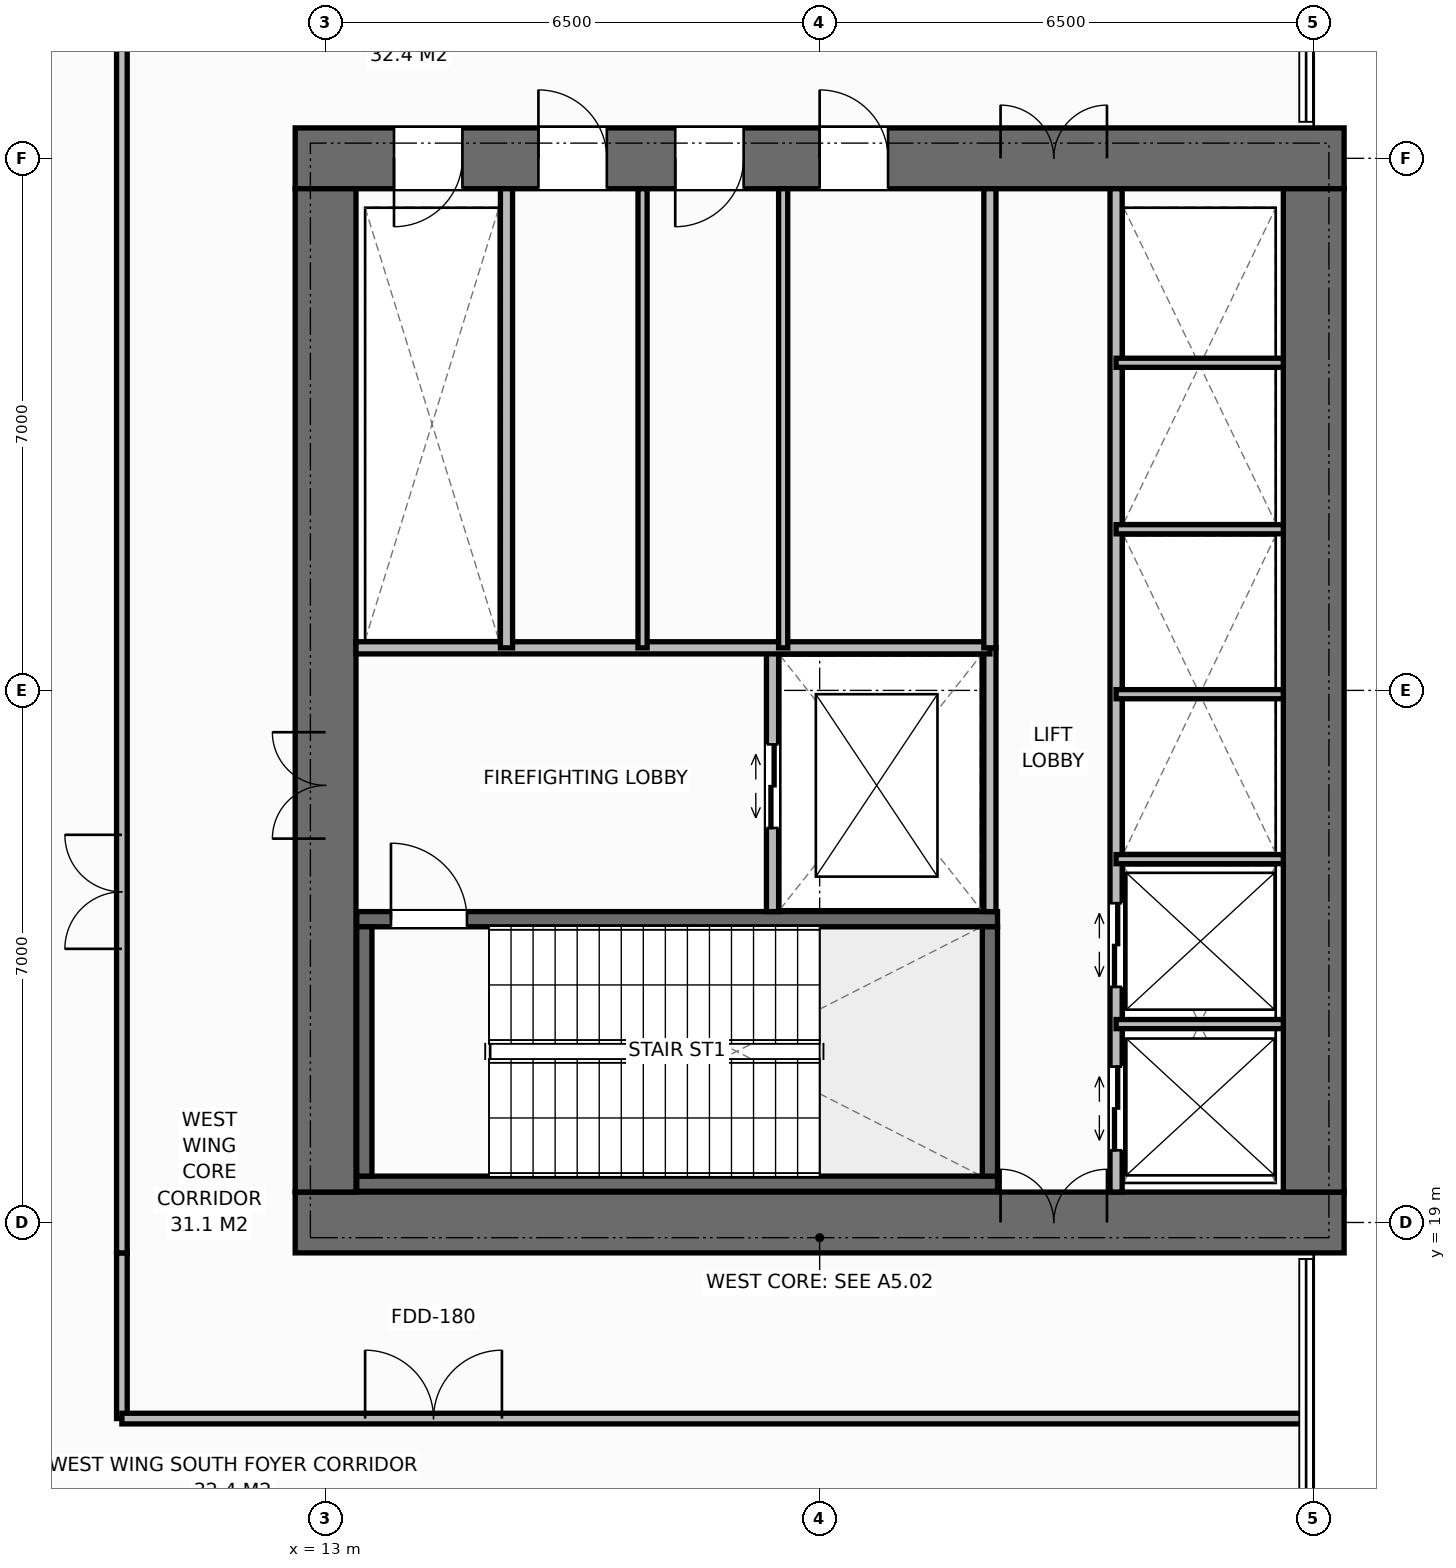
"""IFC4 building model, lengths in metres.
Left out: names, types, materials, properties, quantities, classifications, styles, units other than length and angle.
Written with IfcOpenShell. Run it as: python <this file> out.ifc"""

import sys

from ifc_helpers import new_model, si_unit, direction, frame, frame_2d, origin, place, context, subcontext, project, spatial, rectangle, extrude, element, fill, save


model = new_model("IFC4")
c1 = context("Model", 3, precision=1e-05, world=origin(), true_north=direction((0.0, 1.0)))
c2 = subcontext(c1, "Body", "Model", "MODEL_VIEW")
j1 = project(units=[si_unit("LENGTHUNIT", "METRE"), si_unit("PLANEANGLEUNIT", "RADIAN")], contexts=[c1])
p1 = place(None, origin())
s1 = spatial("IfcSite", under=j1, at=p1, CompositionType="ELEMENT")
p2 = place(p1, origin())
s2 = spatial("IfcBuilding", under=s1, at=p2, CompositionType="ELEMENT")
p3 = place(p2, frame((0.0, 0.0, 11.5)))
s3 = spatial("IfcBuildingStorey", under=s2, at=p3, CompositionType="ELEMENT", Elevation=11.5)
p4 = place(p3, frame((12.6, 19.0, 0.0), z_axis=(0.0, 0.0, 1.0), x_axis=(1.0, 0.0, 0.0)))
e1 = element("IfcWall", 1, at=p4, inside=s3, PredefinedType="SHEAR", context=c2, shape_type="SweptSolid", body=[
    extrude(rectangle(XDim=13.8, YDim=0.8, at=frame_2d((6.9, 0.0))), origin(), (0.0, 0.0, 1.0), 5.5),
])
p5 = place(p4, frame((9.28, 0.0, 0.0)))
e2 = element("IfcOpeningElement", 2, at=p5, cuts=e1, PredefinedType="OPENING", context=c2, shape_type="SweptSolid", body=[
    extrude(rectangle(XDim=1.4, YDim=2.2, at=frame_2d((0.7, 1.1))), frame((0.0, 0.41, 0.0), z_axis=(0.0, -1.0, 0.0), x_axis=(1.0, 0.0, 0.0)), (0.0, 0.0, 1.0), 0.82),
])
p6 = place(p3, frame((12.6, 33.0, 0.0), z_axis=(0.0, 0.0, 1.0), x_axis=(1.0, 0.0, 0.0)))
e3 = element("IfcWall", 3, at=p6, inside=s3, PredefinedType="SHEAR", context=c2, shape_type="SweptSolid", body=[
    extrude(rectangle(XDim=13.8, YDim=0.8, at=frame_2d((6.9, 0.0))), origin(), (0.0, 0.0, 1.0), 5.5),
])
p7 = place(p6, frame((1.3, 0.0, 0.0)))
e4 = element("IfcOpeningElement", 4, at=p7, cuts=e3, PredefinedType="OPENING", context=c2, shape_type="SweptSolid", body=[
    extrude(rectangle(XDim=0.9, YDim=2.15, at=frame_2d((0.45, 1.075))), frame((0.0, 0.41, 0.0), z_axis=(0.0, -1.0, 0.0), x_axis=(1.0, 0.0, 0.0)), (0.0, 0.0, 1.0), 0.82),
])
p8 = place(p6, frame((3.2, 0.0, 0.0)))
e5 = element("IfcOpeningElement", 5, at=p8, cuts=e3, PredefinedType="OPENING", context=c2, shape_type="SweptSolid", body=[
    extrude(rectangle(XDim=0.9, YDim=2.15, at=frame_2d((0.45, 1.075))), frame((0.0, 0.41, 0.0), z_axis=(0.0, -1.0, 0.0), x_axis=(1.0, 0.0, 0.0)), (0.0, 0.0, 1.0), 0.82),
])
p9 = place(p6, frame((5.0, 0.0, 0.0)))
e6 = element("IfcOpeningElement", 6, at=p9, cuts=e3, PredefinedType="OPENING", context=c2, shape_type="SweptSolid", body=[
    extrude(rectangle(XDim=0.9, YDim=2.15, at=frame_2d((0.45, 1.075))), frame((0.0, 0.41, 0.0), z_axis=(0.0, -1.0, 0.0), x_axis=(1.0, 0.0, 0.0)), (0.0, 0.0, 1.0), 0.82),
])
p10 = place(p6, frame((6.9, 0.0, 0.0)))
e7 = element("IfcOpeningElement", 7, at=p10, cuts=e3, PredefinedType="OPENING", context=c2, shape_type="SweptSolid", body=[
    extrude(rectangle(XDim=0.9, YDim=2.15, at=frame_2d((0.45, 1.075))), frame((0.0, 0.41, 0.0), z_axis=(0.0, -1.0, 0.0), x_axis=(1.0, 0.0, 0.0)), (0.0, 0.0, 1.0), 0.82),
])
p11 = place(p6, frame((9.28, 0.0, 0.0)))
e8 = element("IfcOpeningElement", 8, at=p11, cuts=e3, PredefinedType="OPENING", context=c2, shape_type="SweptSolid", body=[
    extrude(rectangle(XDim=1.4, YDim=2.2, at=frame_2d((0.7, 1.1))), frame((0.0, 0.41, 0.0), z_axis=(0.0, -1.0, 0.0), x_axis=(1.0, 0.0, 0.0)), (0.0, 0.0, 1.0), 0.82),
])
p12 = place(p3, frame((13.0, 19.4, 0.0), z_axis=(0.0, 0.0, 1.0), x_axis=(0.0, 1.0, 0.0)))
e9 = element("IfcWall", 9, at=p12, inside=s3, PredefinedType="SHEAR", context=c2, shape_type="SweptSolid", body=[
    extrude(rectangle(XDim=13.2, YDim=0.8, at=frame_2d((6.6, 0.0))), origin(), (0.0, 0.0, 1.0), 5.5),
])
p13 = place(p12, frame((4.65, 0.0, 0.0)))
e10 = element("IfcOpeningElement", 10, at=p13, cuts=e9, PredefinedType="OPENING", context=c2, shape_type="SweptSolid", body=[
    extrude(rectangle(XDim=1.4, YDim=2.2, at=frame_2d((0.7, 1.1))), frame((0.0, 0.41, 0.0), z_axis=(0.0, -1.0, 0.0), x_axis=(1.0, 0.0, 0.0)), (0.0, 0.0, 1.0), 0.82),
])
p14 = place(p3, frame((26.0, 19.4, 0.0), z_axis=(0.0, 0.0, 1.0), x_axis=(0.0, 1.0, 0.0)))
e11 = element("IfcWall", 11, at=p14, inside=s3, PredefinedType="SHEAR", context=c2, shape_type="SweptSolid", body=[
    extrude(rectangle(XDim=13.2, YDim=0.8, at=frame_2d((6.6, 0.0))), origin(), (0.0, 0.0, 1.0), 5.5),
])
p15 = place(p3, frame((13.41, 19.51, 0.0), z_axis=(0.0, 0.0, 1.0), x_axis=(1.0, 0.0, 0.0)))
e12 = element("IfcWall", 12, at=p15, inside=s3, PredefinedType="SHEAR", context=c2, shape_type="SweptSolid", body=[
    extrude(rectangle(XDim=8.43, YDim=0.2, at=frame_2d((4.215, 0.0))), origin(), (0.0, 0.0, 1.0), 5.5),
])
p16 = place(p3, frame((13.41, 22.99, 0.0), z_axis=(0.0, 0.0, 1.0), x_axis=(1.0, 0.0, 0.0)))
e13 = element("IfcWall", 13, at=p16, inside=s3, PredefinedType="SHEAR", context=c2, shape_type="SweptSolid", body=[
    extrude(rectangle(XDim=8.43, YDim=0.2, at=frame_2d((4.215, 0.0))), origin(), (0.0, 0.0, 1.0), 5.5),
])
p17 = place(p16, frame((0.45, 0.0, 0.0)))
e14 = element("IfcOpeningElement", 14, at=p17, cuts=e13, PredefinedType="OPENING", context=c2, shape_type="SweptSolid", body=[
    extrude(rectangle(XDim=1.0, YDim=2.15, at=frame_2d((0.5, 1.075))), frame((0.0, 0.11, 0.0), z_axis=(0.0, -1.0, 0.0), x_axis=(1.0, 0.0, 0.0)), (0.0, 0.0, 1.0), 0.22),
])
for number, where, z_axis, x_axis in (
    (15, (13.51, 19.61, 0.0), (0.0, 0.0, 1.0), (0.0, 1.0, 0.0)),
    (16, (21.74, 19.61, 0.0), (0.0, 0.0, 1.0), (0.0, 1.0, 0.0)),
):
    element("IfcWall", number, at=place(p3, frame(where, z_axis=z_axis, x_axis=x_axis)), inside=s3, PredefinedType="SHEAR", context=c2, shape_type="SweptSolid", body=[
        extrude(rectangle(XDim=3.28, YDim=0.2, at=frame_2d((1.64, 0.0))), origin(), (0.0, 0.0, 1.0), 5.5),
    ])
p18 = place(p3, frame((21.74, 23.09, 0.0), z_axis=(0.0, 0.0, 1.0), x_axis=(0.0, 1.0, 0.0)))
e17 = element("IfcWall", 17, at=p18, inside=s3, PredefinedType="STANDARD", context=c2, shape_type="SweptSolid", body=[
    extrude(rectangle(XDim=3.47, YDim=0.16, at=frame_2d((1.735, 0.0))), origin(), (0.0, 0.0, 1.0), 5.22),
])
p19 = place(p3, frame((18.88, 23.09, 0.0), z_axis=(0.0, 0.0, 1.0), x_axis=(0.0, 1.0, 0.0)))
e18 = element("IfcWall", 18, at=p19, inside=s3, PredefinedType="STANDARD", context=c2, shape_type="SweptSolid", body=[
    extrude(rectangle(XDim=3.47, YDim=0.16, at=frame_2d((1.735, 0.0))), origin(), (0.0, 0.0, 1.0), 5.22),
])
p20 = place(p19, frame((1.1, 0.0, 0.0)))
e19 = element("IfcOpeningElement", 19, at=p20, cuts=e18, PredefinedType="OPENING", context=c2, shape_type="SweptSolid", body=[
    extrude(rectangle(XDim=1.1, YDim=2.2, at=frame_2d((0.55, 1.1))), frame((0.0, 0.09, 0.0), z_axis=(0.0, -1.0, 0.0), x_axis=(1.0, 0.0, 0.0)), (0.0, 0.0, 1.0), 0.18),
])
p21 = place(p3, frame((13.4, 26.56, 0.0), z_axis=(0.0, 0.0, 1.0), x_axis=(1.0, 0.0, 0.0)))
e20 = element("IfcWall", 20, at=p21, inside=s3, PredefinedType="STANDARD", context=c2, shape_type="SweptSolid", body=[
    extrude(rectangle(XDim=8.34, YDim=0.16, at=frame_2d((4.17, 0.0))), origin(), (0.0, 0.0, 1.0), 5.22),
])
p22 = place(p3, frame((15.38, 26.56, 0.0), z_axis=(0.0, 0.0, 1.0), x_axis=(0.0, 1.0, 0.0)))
e21 = element("IfcWall", 21, at=p22, inside=s3, PredefinedType="STANDARD", context=c2, shape_type="SweptSolid", body=[
    extrude(rectangle(XDim=6.04, YDim=0.16, at=frame_2d((3.02, 0.0))), origin(), (0.0, 0.0, 1.0), 5.22),
])
for number, where, z_axis, x_axis in (
    (22, (17.17, 26.56, 0.0), (0.0, 0.0, 1.0), (0.0, 1.0, 0.0)),
    (23, (19.02, 26.56, 0.0), (0.0, 0.0, 1.0), (0.0, 1.0, 0.0)),
):
    element("IfcWall", number, at=place(p3, frame(where, z_axis=z_axis, x_axis=x_axis)), inside=s3, PredefinedType="PARTITIONING", context=c2, shape_type="SweptSolid", body=[
        extrude(rectangle(XDim=6.04, YDim=0.12, at=frame_2d((3.02, 0.0))), origin(), (0.0, 0.0, 1.0), 5.22),
    ])
p23 = place(p3, frame((21.74, 26.56, 0.0), z_axis=(0.0, 0.0, 1.0), x_axis=(0.0, 1.0, 0.0)))
e24 = element("IfcWall", 24, at=p23, inside=s3, PredefinedType="STANDARD", context=c2, shape_type="SweptSolid", body=[
    extrude(rectangle(XDim=6.04, YDim=0.16, at=frame_2d((3.02, 0.0))), origin(), (0.0, 0.0, 1.0), 5.22),
])
p24 = place(p3, frame((23.4, 19.4, 0.0), z_axis=(0.0, 0.0, 1.0), x_axis=(0.0, 1.0, 0.0)))
e25 = element("IfcWall", 25, at=p24, inside=s3, PredefinedType="STANDARD", context=c2, shape_type="SweptSolid", body=[
    extrude(rectangle(XDim=13.2, YDim=0.16, at=frame_2d((6.6, 0.0))), origin(), (0.0, 0.0, 1.0), 5.22),
])
p25 = place(p24, frame((0.55, 0.0, 0.0)))
e26 = element("IfcOpeningElement", 26, at=p25, cuts=e25, PredefinedType="OPENING", context=c2, shape_type="SweptSolid", body=[
    extrude(rectangle(XDim=1.1, YDim=2.2, at=frame_2d((0.55, 1.1))), frame((0.0, 0.09, 0.0), z_axis=(0.0, -1.0, 0.0), x_axis=(1.0, 0.0, 0.0)), (0.0, 0.0, 1.0), 0.18),
])
p26 = place(p24, frame((2.7, 0.0, 0.0)))
e27 = element("IfcOpeningElement", 27, at=p26, cuts=e25, PredefinedType="OPENING", context=c2, shape_type="SweptSolid", body=[
    extrude(rectangle(XDim=1.1, YDim=2.2, at=frame_2d((0.55, 1.1))), frame((0.0, 0.09, 0.0), z_axis=(0.0, -1.0, 0.0), x_axis=(1.0, 0.0, 0.0)), (0.0, 0.0, 1.0), 0.18),
])
for number, where, z_axis, x_axis in (
    (28, (23.4, 21.61, 0.0), (0.0, 0.0, 1.0), (1.0, 0.0, 0.0)),
    (29, (23.4, 23.78, 0.0), (0.0, 0.0, 1.0), (1.0, 0.0, 0.0)),
    (30, (23.4, 25.95, 0.0), (0.0, 0.0, 1.0), (1.0, 0.0, 0.0)),
    (31, (23.4, 28.12, 0.0), (0.0, 0.0, 1.0), (1.0, 0.0, 0.0)),
    (32, (23.4, 30.31, 0.0), (0.0, 0.0, 1.0), (1.0, 0.0, 0.0)),
):
    element("IfcWall", number, at=place(p3, frame(where, z_axis=z_axis, x_axis=x_axis)), inside=s3, PredefinedType="PARTITIONING", context=c2, shape_type="SweptSolid", body=[
        extrude(rectangle(XDim=2.2, YDim=0.12, at=frame_2d((1.1, 0.0))), origin(), (0.0, 0.0, 1.0), 5.22),
    ])
p27 = place(p3, frame((10.32, 16.42, 0.0), z_axis=(0.0, 0.0, 1.0), x_axis=(0.0, 1.0, 0.0)))
e33 = element("IfcWall", 33, at=p27, inside=s3, PredefinedType="PARTITIONING", context=c2, shape_type="SweptSolid", body=[
    extrude(rectangle(XDim=2.18, YDim=0.14, at=frame_2d((1.09, 0.0))), origin(), (0.0, 0.0, 1.0), 5.22),
])
p28 = place(p3, frame((10.32, 16.42, 0.0), z_axis=(0.0, 0.0, 1.0), x_axis=(1.0, 0.0, 0.0)))
e34 = element("IfcWall", 34, at=p28, inside=s3, PredefinedType="PARTITIONING", context=c2, shape_type="SweptSolid", body=[
    extrude(rectangle(XDim=15.6, YDim=0.14, at=frame_2d((7.8, 0.0))), origin(), (0.0, 0.0, 1.0), 5.22),
])
p29 = place(p28, frame((3.2, 0.0, 0.0)))
e35 = element("IfcOpeningElement", 35, at=p29, cuts=e34, PredefinedType="OPENING", context=c2, shape_type="SweptSolid", body=[
    extrude(rectangle(XDim=1.8, YDim=2.2, at=frame_2d((0.9, 1.1))), frame((0.0, 0.08, 0.0), z_axis=(0.0, -1.0, 0.0), x_axis=(1.0, 0.0, 0.0)), (0.0, 0.0, 1.0), 0.16),
])
p30 = place(p3, frame((10.32, 18.6, 0.0), z_axis=(0.0, 0.0, 1.0), x_axis=(0.0, 1.0, 0.0)))
e36 = element("IfcWall", 36, at=p30, inside=s3, PredefinedType="PARTITIONING", context=c2, shape_type="SweptSolid", body=[
    extrude(rectangle(XDim=16.98, YDim=0.14, at=frame_2d((8.49, 0.0))), origin(), (0.0, 0.0, 1.0), 5.22),
])
p31 = place(p30, frame((4.0, 0.0, 0.0)))
e37 = element("IfcOpeningElement", 37, at=p31, cuts=e36, PredefinedType="OPENING", context=c2, shape_type="SweptSolid", body=[
    extrude(rectangle(XDim=1.5, YDim=2.2, at=frame_2d((0.75, 1.1))), frame((0.0, 0.08, 0.0), z_axis=(0.0, -1.0, 0.0), x_axis=(1.0, 0.0, 0.0)), (0.0, 0.0, 1.0), 0.16),
])
p32 = place(p17, origin())
e38 = element("IfcDoor", 38, at=p32, inside=s3, OperationType="SINGLE_SWING_LEFT", PredefinedType="DOOR", context=c2, shape_type="SweptSolid", body=[
    extrude(rectangle(XDim=1.0, YDim=2.15, at=frame_2d((0.5, 1.075))), frame((0.0, 0.025, 0.0), z_axis=(0.0, -1.0, 0.0), x_axis=(1.0, 0.0, 0.0)), (0.0, 0.0, 1.0), 0.05),
])
fill(e14, e38)
p33 = place(p13, origin())
e39 = element("IfcDoor", 39, at=p33, inside=s3, OperationType="DOUBLE_DOOR_SINGLE_SWING", PredefinedType="DOOR", context=c2, shape_type="SweptSolid", body=[
    extrude(rectangle(XDim=1.4, YDim=2.2, at=frame_2d((0.7, 1.1))), frame((0.0, 0.025, 0.0), z_axis=(0.0, -1.0, 0.0), x_axis=(1.0, 0.0, 0.0)), (0.0, 0.0, 1.0), 0.05),
])
fill(e10, e39)
p34 = place(p20, origin())
e40 = element("IfcDoor", 40, at=p34, inside=s3, OperationType="DOUBLE_DOOR_SLIDING", PredefinedType="DOOR", context=c2, shape_type="SweptSolid", body=[
    extrude(rectangle(XDim=1.1, YDim=2.2, at=frame_2d((0.55, 1.1))), frame((0.0, 0.025, 0.0), z_axis=(0.0, -1.0, 0.0), x_axis=(1.0, 0.0, 0.0)), (0.0, 0.0, 1.0), 0.05),
])
fill(e19, e40)
p35 = place(p7, origin())
e41 = element("IfcDoor", 41, at=p35, inside=s3, OperationType="SINGLE_SWING_RIGHT", PredefinedType="DOOR", context=c2, shape_type="SweptSolid", body=[
    extrude(rectangle(XDim=0.9, YDim=2.15, at=frame_2d((0.45, 1.075))), frame((0.0, -0.075, 0.0), z_axis=(0.0, -1.0, 0.0), x_axis=(1.0, 0.0, 0.0)), (0.0, 0.0, 1.0), 0.05),
])
fill(e4, e41)
p36 = place(p8, origin())
e42 = element("IfcDoor", 42, at=p36, inside=s3, OperationType="SINGLE_SWING_LEFT", PredefinedType="DOOR", context=c2, shape_type="SweptSolid", body=[
    extrude(rectangle(XDim=0.9, YDim=2.15, at=frame_2d((0.45, 1.075))), frame((0.0, -0.075, 0.0), z_axis=(0.0, -1.0, 0.0), x_axis=(1.0, 0.0, 0.0)), (0.0, 0.0, 1.0), 0.05),
])
fill(e5, e42)
p37 = place(p9, origin())
e43 = element("IfcDoor", 43, at=p37, inside=s3, OperationType="SINGLE_SWING_RIGHT", PredefinedType="DOOR", context=c2, shape_type="SweptSolid", body=[
    extrude(rectangle(XDim=0.9, YDim=2.15, at=frame_2d((0.45, 1.075))), frame((0.0, -0.075, 0.0), z_axis=(0.0, -1.0, 0.0), x_axis=(1.0, 0.0, 0.0)), (0.0, 0.0, 1.0), 0.05),
])
fill(e6, e43)
p38 = place(p10, origin())
e44 = element("IfcDoor", 44, at=p38, inside=s3, OperationType="SINGLE_SWING_LEFT", PredefinedType="DOOR", context=c2, shape_type="SweptSolid", body=[
    extrude(rectangle(XDim=0.9, YDim=2.15, at=frame_2d((0.45, 1.075))), frame((0.0, -0.075, 0.0), z_axis=(0.0, -1.0, 0.0), x_axis=(1.0, 0.0, 0.0)), (0.0, 0.0, 1.0), 0.05),
])
fill(e7, e44)
p39 = place(p5, origin())
e45 = element("IfcDoor", 45, at=p39, inside=s3, OperationType="DOUBLE_DOOR_SINGLE_SWING", PredefinedType="DOOR", context=c2, shape_type="SweptSolid", body=[
    extrude(rectangle(XDim=1.4, YDim=2.2, at=frame_2d((0.7, 1.1))), frame((0.0, 0.125, 0.0), z_axis=(0.0, -1.0, 0.0), x_axis=(1.0, 0.0, 0.0)), (0.0, 0.0, 1.0), 0.05),
])
fill(e2, e45)
p40 = place(p11, origin())
e46 = element("IfcDoor", 46, at=p40, inside=s3, OperationType="DOUBLE_DOOR_SINGLE_SWING", PredefinedType="DOOR", context=c2, shape_type="SweptSolid", body=[
    extrude(rectangle(XDim=1.4, YDim=2.2, at=frame_2d((0.7, 1.1))), frame((0.0, -0.075, 0.0), z_axis=(0.0, -1.0, 0.0), x_axis=(1.0, 0.0, 0.0)), (0.0, 0.0, 1.0), 0.05),
])
fill(e8, e46)
p41 = place(p25, origin())
e47 = element("IfcDoor", 47, at=p41, inside=s3, OperationType="DOUBLE_DOOR_SLIDING", PredefinedType="DOOR", context=c2, shape_type="SweptSolid", body=[
    extrude(rectangle(XDim=1.1, YDim=2.2, at=frame_2d((0.55, 1.1))), frame((0.0, 0.025, 0.0), z_axis=(0.0, -1.0, 0.0), x_axis=(1.0, 0.0, 0.0)), (0.0, 0.0, 1.0), 0.05),
])
fill(e26, e47)
p42 = place(p26, origin())
e48 = element("IfcDoor", 48, at=p42, inside=s3, OperationType="DOUBLE_DOOR_SLIDING", PredefinedType="DOOR", context=c2, shape_type="SweptSolid", body=[
    extrude(rectangle(XDim=1.1, YDim=2.2, at=frame_2d((0.55, 1.1))), frame((0.0, 0.025, 0.0), z_axis=(0.0, -1.0, 0.0), x_axis=(1.0, 0.0, 0.0)), (0.0, 0.0, 1.0), 0.05),
])
fill(e27, e48)
p43 = place(p29, origin())
e49 = element("IfcDoor", 49, at=p43, inside=s3, OperationType="DOUBLE_DOOR_SINGLE_SWING", PredefinedType="DOOR", context=c2, shape_type="SweptSolid", body=[
    extrude(rectangle(XDim=1.8, YDim=2.2, at=frame_2d((0.9, 1.1))), frame((0.0, 0.025, 0.0), z_axis=(0.0, -1.0, 0.0), x_axis=(1.0, 0.0, 0.0)), (0.0, 0.0, 1.0), 0.05),
])
fill(e35, e49)
p44 = place(p31, origin())
e50 = element("IfcDoor", 50, at=p44, inside=s3, OperationType="DOUBLE_DOOR_SINGLE_SWING", PredefinedType="DOOR", context=c2, shape_type="SweptSolid", body=[
    extrude(rectangle(XDim=1.5, YDim=2.2, at=frame_2d((0.75, 1.1))), frame((0.0, 0.025, 0.0), z_axis=(0.0, -1.0, 0.0), x_axis=(1.0, 0.0, 0.0)), (0.0, 0.0, 1.0), 0.05),
])
fill(e37, e50)
save(model, sys.argv[1])
